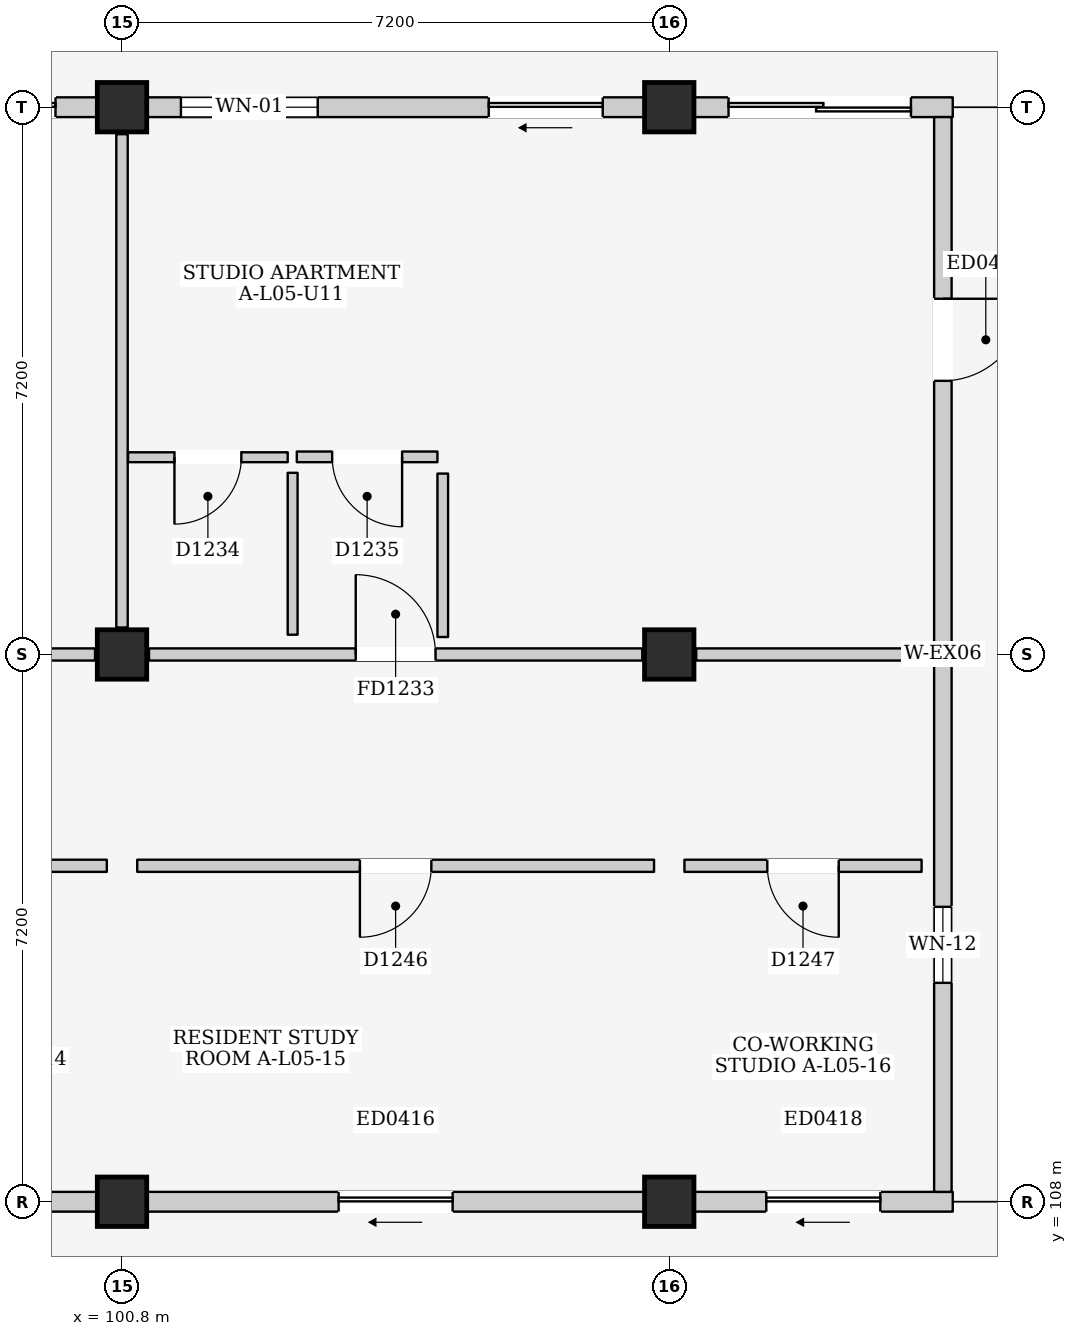
"""IFC4 building model, lengths in metres.
Left out: names, types, materials, properties, quantities, classifications, styles, units other than length and angle.
Written with IfcOpenShell. Run it as: python <this file> out.ifc"""

import sys

from ifc_helpers import new_model, si_unit, direction, frame, frame_2d, origin, origin_2d, place, context, subcontext, project, spatial, rectangle, extrude, element, fill, save


model = new_model("IFC4")
c1 = context("Model", 3, precision=1e-05, world=origin(), true_north=direction((0.0, 1.0)))
c2 = subcontext(c1, "Body", "Model", "MODEL_VIEW")
j1 = project(units=[si_unit("LENGTHUNIT", "METRE"), si_unit("PLANEANGLEUNIT", "RADIAN")], contexts=[c1])
p1 = place(None, origin())
s1 = spatial("IfcSite", under=j1, at=p1, CompositionType="ELEMENT")
p2 = place(p1, origin())
s2 = spatial("IfcBuilding", under=s1, at=p2, CompositionType="ELEMENT")
p3 = place(p2, frame((0.0, 0.0, 18.6)))
s3 = spatial("IfcBuildingStorey", under=s2, at=p3, CompositionType="ELEMENT", Elevation=18.6)
for number, where, z_axis, x_axis in (
    (1, (100.8, 108.0, 0.0), (0.0, 0.0, 1.0), (1.0, 0.0, 0.0)),
    (2, (100.8, 115.2, 0.0), (0.0, 0.0, 1.0), (1.0, 0.0, 0.0)),
    (3, (100.8, 122.4, 0.0), (0.0, 0.0, 1.0), (1.0, 0.0, 0.0)),
    (4, (108.0, 108.0, 0.0), (0.0, 0.0, 1.0), (1.0, 0.0, 0.0)),
    (5, (108.0, 115.2, 0.0), (0.0, 0.0, 1.0), (1.0, 0.0, 0.0)),
    (6, (108.0, 122.4, 0.0), (0.0, 0.0, 1.0), (1.0, 0.0, 0.0)),
):
    element("IfcColumn", number, at=place(p3, frame(where, z_axis=z_axis, x_axis=x_axis)), inside=s3, PredefinedType="COLUMN", context=c2, shape_type="SweptSolid", body=[
        extrude(rectangle(XDim=0.65, YDim=0.65, at=origin_2d()), origin(), (0.0, 0.0, 1.0), 3.3),
    ])
p4 = place(p3, frame((93.925, 122.4, 0.0), z_axis=(0.0, 0.0, 1.0), x_axis=(1.0, 0.0, 0.0)))
e7 = element("IfcWall", 7, at=p4, inside=s3, PredefinedType="ELEMENTEDWALL", context=c2, shape_type="SweptSolid", body=[
    extrude(rectangle(XDim=6.55, YDim=0.26, at=frame_2d((3.275, 0.0))), origin(), (0.0, 0.0, 1.0), 2.595),
])
p5 = place(p4, frame((4.4, 0.0, 0.0)))
e8 = element("IfcOpeningElement", 8, at=p5, cuts=e7, PredefinedType="OPENING", context=c2, shape_type="SweptSolid", body=[
    extrude(rectangle(XDim=1.6, YDim=2.12, at=frame_2d((0.8, 1.06))), frame((0.0, 0.145, 0.0), z_axis=(0.0, -1.0, 0.0), x_axis=(1.0, 0.0, 0.0)), (0.0, 0.0, 1.0), 0.29),
])
p6 = place(p4, frame((0.45, 0.0, 0.9)))
e9 = element("IfcOpeningElement", 9, at=p6, cuts=e7, PredefinedType="OPENING", context=c2, shape_type="SweptSolid", body=[
    extrude(rectangle(XDim=1.75, YDim=1.55, at=frame_2d((0.875, 0.775))), frame((0.0, 0.145, 0.0), z_axis=(0.0, -1.0, 0.0), x_axis=(1.0, 0.0, 0.0)), (0.0, 0.0, 1.0), 0.29),
])
p7 = place(p3, frame((93.925, 108.0, 0.0), z_axis=(0.0, 0.0, 1.0), x_axis=(1.0, 0.0, 0.0)))
e10 = element("IfcWall", 10, at=p7, inside=s3, PredefinedType="ELEMENTEDWALL", context=c2, shape_type="SweptSolid", body=[
    extrude(rectangle(XDim=6.55, YDim=0.26, at=frame_2d((3.275, 0.0))), origin(), (0.0, 0.0, 1.0), 2.395),
])
p8 = place(p7, frame((2.525, 0.0, 0.0)))
e11 = element("IfcOpeningElement", 11, at=p8, cuts=e10, PredefinedType="OPENING", context=c2, shape_type="SweptSolid", body=[
    extrude(rectangle(XDim=1.5, YDim=2.12, at=frame_2d((0.75, 1.06))), frame((0.0, 0.145, 0.0), z_axis=(0.0, -1.0, 0.0), x_axis=(1.0, 0.0, 0.0)), (0.0, 0.0, 1.0), 0.29),
])
p9 = place(p3, frame((101.125, 122.4, 0.0), z_axis=(0.0, 0.0, 1.0), x_axis=(1.0, 0.0, 0.0)))
e12 = element("IfcWall", 12, at=p9, inside=s3, PredefinedType="ELEMENTEDWALL", context=c2, shape_type="SweptSolid", body=[
    extrude(rectangle(XDim=6.55, YDim=0.26, at=frame_2d((3.275, 0.0))), origin(), (0.0, 0.0, 1.0), 2.595),
])
p10 = place(p9, frame((4.5, 0.0, 0.0)))
e13 = element("IfcOpeningElement", 13, at=p10, cuts=e12, PredefinedType="OPENING", context=c2, shape_type="SweptSolid", body=[
    extrude(rectangle(XDim=1.5, YDim=2.12, at=frame_2d((0.75, 1.06))), frame((0.0, 0.145, 0.0), z_axis=(0.0, -1.0, 0.0), x_axis=(1.0, 0.0, 0.0)), (0.0, 0.0, 1.0), 0.29),
])
p11 = place(p9, frame((0.45, 0.0, 0.9)))
e14 = element("IfcOpeningElement", 14, at=p11, cuts=e12, PredefinedType="OPENING", context=c2, shape_type="SweptSolid", body=[
    extrude(rectangle(XDim=1.8, YDim=1.5, at=frame_2d((0.9, 0.75))), frame((0.0, 0.145, 0.0), z_axis=(0.0, -1.0, 0.0), x_axis=(1.0, 0.0, 0.0)), (0.0, 0.0, 1.0), 0.29),
])
p12 = place(p3, frame((101.125, 108.0, 0.0), z_axis=(0.0, 0.0, 1.0), x_axis=(1.0, 0.0, 0.0)))
e15 = element("IfcWall", 15, at=p12, inside=s3, PredefinedType="ELEMENTEDWALL", context=c2, shape_type="SweptSolid", body=[
    extrude(rectangle(XDim=6.55, YDim=0.26, at=frame_2d((3.275, 0.0))), origin(), (0.0, 0.0, 1.0), 2.395),
])
p13 = place(p12, frame((2.525, 0.0, 0.0)))
e16 = element("IfcOpeningElement", 16, at=p13, cuts=e15, PredefinedType="OPENING", context=c2, shape_type="SweptSolid", body=[
    extrude(rectangle(XDim=1.5, YDim=2.12, at=frame_2d((0.75, 1.06))), frame((0.0, 0.145, 0.0), z_axis=(0.0, -1.0, 0.0), x_axis=(1.0, 0.0, 0.0)), (0.0, 0.0, 1.0), 0.29),
])
p14 = place(p3, frame((108.325, 122.4, 0.0), z_axis=(0.0, 0.0, 1.0), x_axis=(1.0, 0.0, 0.0)))
e17 = element("IfcWall", 17, at=p14, inside=s3, PredefinedType="ELEMENTEDWALL", context=c2, shape_type="SweptSolid", body=[
    extrude(rectangle(XDim=3.405, YDim=0.26, at=frame_2d((1.703, 0.0))), origin(), (0.0, 0.0, 1.0), 2.395),
])
p15 = place(p14, frame((0.455, 0.0, 0.0)))
e18 = element("IfcOpeningElement", 18, at=p15, cuts=e17, PredefinedType="OPENING", context=c2, shape_type="SweptSolid", body=[
    extrude(rectangle(XDim=2.4, YDim=2.12, at=frame_2d((1.2, 1.06))), frame((0.0, 0.145, 0.0), z_axis=(0.0, -1.0, 0.0), x_axis=(1.0, 0.0, 0.0)), (0.0, 0.0, 1.0), 0.29),
])
p16 = place(p3, frame((108.325, 108.0, 0.0), z_axis=(0.0, 0.0, 1.0), x_axis=(1.0, 0.0, 0.0)))
e19 = element("IfcWall", 19, at=p16, inside=s3, PredefinedType="ELEMENTEDWALL", context=c2, shape_type="SweptSolid", body=[
    extrude(rectangle(XDim=3.405, YDim=0.26, at=frame_2d((1.703, 0.0))), origin(), (0.0, 0.0, 1.0), 2.395),
])
p17 = place(p16, frame((0.952, 0.0, 0.0)))
e20 = element("IfcOpeningElement", 20, at=p17, cuts=e19, PredefinedType="OPENING", context=c2, shape_type="SweptSolid", body=[
    extrude(rectangle(XDim=1.5, YDim=2.12, at=frame_2d((0.75, 1.06))), frame((0.0, 0.145, 0.0), z_axis=(0.0, -1.0, 0.0), x_axis=(1.0, 0.0, 0.0)), (0.0, 0.0, 1.0), 0.29),
])
p18 = place(p3, frame((111.6, 108.13, 0.0), z_axis=(0.0, 0.0, 1.0), x_axis=(0.0, 1.0, 0.0)))
e21 = element("IfcWall", 21, at=p18, inside=s3, PredefinedType="ELEMENTEDWALL", context=c2, shape_type="SweptSolid", body=[
    extrude(rectangle(XDim=7.07, YDim=0.23, at=frame_2d((3.535, 0.0))), origin(), (0.0, 0.0, 1.0), 2.495),
])
p19 = place(p18, frame((2.75, 0.0, 1.1)))
e22 = element("IfcOpeningElement", 22, at=p19, cuts=e21, PredefinedType="OPENING", context=c2, shape_type="SweptSolid", body=[
    extrude(rectangle(XDim=1.0, YDim=0.9, at=frame_2d((0.5, 0.45))), frame((0.0, 0.13, 0.0), z_axis=(0.0, -1.0, 0.0), x_axis=(1.0, 0.0, 0.0)), (0.0, 0.0, 1.0), 0.26),
])
p20 = place(p3, frame((111.6, 115.2, 0.0), z_axis=(0.0, 0.0, 1.0), x_axis=(0.0, 1.0, 0.0)))
e23 = element("IfcWall", 23, at=p20, inside=s3, PredefinedType="ELEMENTEDWALL", context=c2, shape_type="SweptSolid", body=[
    extrude(rectangle(XDim=7.07, YDim=0.23, at=frame_2d((3.535, 0.0))), origin(), (0.0, 0.0, 1.0), 2.495),
])
p21 = place(p20, frame((3.6, 0.0, 0.0)))
e24 = element("IfcOpeningElement", 24, at=p21, cuts=e23, PredefinedType="OPENING", context=c2, shape_type="SweptSolid", body=[
    extrude(rectangle(XDim=1.08, YDim=2.12, at=frame_2d((0.54, 1.06))), frame((0.0, 0.13, 0.0), z_axis=(0.0, -1.0, 0.0), x_axis=(1.0, 0.0, 0.0)), (0.0, 0.0, 1.0), 0.26),
])
p22 = place(p3, frame((93.955, 115.2, 0.0), z_axis=(0.0, 0.0, 1.0), x_axis=(1.0, 0.0, 0.0)))
e25 = element("IfcWall", 25, at=p22, inside=s3, PredefinedType="PARTITIONING", context=c2, shape_type="SweptSolid", body=[
    extrude(rectangle(XDim=6.49, YDim=0.16, at=frame_2d((3.245, 0.0))), origin(), (0.0, 0.0, 1.0), 2.395),
])
p23 = place(p22, frame((2.72, 0.0, 0.0)))
e26 = element("IfcOpeningElement", 26, at=p23, cuts=e25, PredefinedType="OPENING", context=c2, shape_type="SweptSolid", body=[
    extrude(rectangle(XDim=1.05, YDim=2.15, at=frame_2d((0.525, 1.075))), frame((0.0, 0.095, 0.0), z_axis=(0.0, -1.0, 0.0), x_axis=(1.0, 0.0, 0.0)), (0.0, 0.0, 1.0), 0.19),
])
p24 = place(p3, frame((100.8, 115.555, 0.0), z_axis=(0.0, 0.0, 1.0), x_axis=(0.0, 1.0, 0.0)))
e27 = element("IfcWall", 27, at=p24, inside=s3, PredefinedType="PARTITIONING", context=c2, shape_type="SweptSolid", body=[
    extrude(rectangle(XDim=6.49, YDim=0.15, at=frame_2d((3.245, 0.0))), origin(), (0.0, 0.0, 1.0), 2.545),
])
p25 = place(p3, frame((101.155, 115.2, 0.0), z_axis=(0.0, 0.0, 1.0), x_axis=(1.0, 0.0, 0.0)))
e28 = element("IfcWall", 28, at=p25, inside=s3, PredefinedType="PARTITIONING", context=c2, shape_type="SweptSolid", body=[
    extrude(rectangle(XDim=6.49, YDim=0.16, at=frame_2d((3.245, 0.0))), origin(), (0.0, 0.0, 1.0), 2.395),
])
p26 = place(p25, frame((2.72, 0.0, 0.0)))
e29 = element("IfcOpeningElement", 29, at=p26, cuts=e28, PredefinedType="OPENING", context=c2, shape_type="SweptSolid", body=[
    extrude(rectangle(XDim=1.05, YDim=2.15, at=frame_2d((0.525, 1.075))), frame((0.0, 0.095, 0.0), z_axis=(0.0, -1.0, 0.0), x_axis=(1.0, 0.0, 0.0)), (0.0, 0.0, 1.0), 0.19),
])
p27 = place(p3, frame((108.355, 115.2, 0.0), z_axis=(0.0, 0.0, 1.0), x_axis=(1.0, 0.0, 0.0)))
e30 = element("IfcWall", 30, at=p27, inside=s3, PredefinedType="PARTITIONING", context=c2, shape_type="SweptSolid", body=[
    extrude(rectangle(XDim=2.965, YDim=0.16, at=frame_2d((1.482, 0.0))), origin(), (0.0, 0.0, 1.0), 2.395),
])
p28 = place(p3, frame((100.88, 117.795, 0.0), z_axis=(0.0, 0.0, 1.0), x_axis=(1.0, 0.0, 0.0)))
e31 = element("IfcWall", 31, at=p28, inside=s3, PredefinedType="PARTITIONING", context=c2, shape_type="SweptSolid", body=[
    extrude(rectangle(XDim=2.1, YDim=0.13, at=frame_2d((1.05, 0.0))), origin(), (0.0, 0.0, 1.0), 3.06),
])
p29 = place(p28, frame((0.61, 0.0, 0.0)))
e32 = element("IfcOpeningElement", 32, at=p29, cuts=e31, PredefinedType="OPENING", context=c2, shape_type="SweptSolid", body=[
    extrude(rectangle(XDim=0.88, YDim=2.1, at=frame_2d((0.44, 1.05))), frame((0.0, 0.08, 0.0), z_axis=(0.0, -1.0, 0.0), x_axis=(1.0, 0.0, 0.0)), (0.0, 0.0, 1.0), 0.16),
])
p30 = place(p3, frame((103.045, 115.46, 0.0), z_axis=(0.0, 0.0, 1.0), x_axis=(0.0, 1.0, 0.0)))
e33 = element("IfcWall", 33, at=p30, inside=s3, PredefinedType="PARTITIONING", context=c2, shape_type="SweptSolid", body=[
    extrude(rectangle(XDim=2.13, YDim=0.13, at=frame_2d((1.065, 0.0))), origin(), (0.0, 0.0, 1.0), 3.06),
])
p31 = place(p3, frame((103.1, 117.8, 0.0), z_axis=(0.0, 0.0, 1.0), x_axis=(1.0, 0.0, 0.0)))
e34 = element("IfcWall", 34, at=p31, inside=s3, PredefinedType="PARTITIONING", context=c2, shape_type="SweptSolid", body=[
    extrude(rectangle(XDim=1.85, YDim=0.14, at=frame_2d((0.925, 0.0))), origin(), (0.0, 0.0, 1.0), 3.06),
])
p32 = place(p31, frame((0.465, 0.0, 0.0)))
e35 = element("IfcOpeningElement", 35, at=p32, cuts=e34, PredefinedType="OPENING", context=c2, shape_type="SweptSolid", body=[
    extrude(rectangle(XDim=0.92, YDim=2.1, at=frame_2d((0.46, 1.05))), frame((0.0, 0.085, 0.0), z_axis=(0.0, -1.0, 0.0), x_axis=(1.0, 0.0, 0.0)), (0.0, 0.0, 1.0), 0.17),
])
p33 = place(p3, frame((105.02, 115.43, 0.0), z_axis=(0.0, 0.0, 1.0), x_axis=(0.0, 1.0, 0.0)))
e36 = element("IfcWall", 36, at=p33, inside=s3, PredefinedType="PARTITIONING", context=c2, shape_type="SweptSolid", body=[
    extrude(rectangle(XDim=2.15, YDim=0.14, at=frame_2d((1.075, 0.0))), origin(), (0.0, 0.0, 1.0), 3.06),
])
p34 = place(p3, frame((93.8, 112.42, 0.0), z_axis=(0.0, 0.0, 1.0), x_axis=(1.0, 0.0, 0.0)))
e37 = element("IfcWall", 37, at=p34, inside=s3, PredefinedType="PARTITIONING", context=c2, shape_type="SweptSolid", body=[
    extrude(rectangle(XDim=6.8, YDim=0.16, at=frame_2d((3.4, 0.0))), origin(), (0.0, 0.0, 1.0), 3.06),
])
p35 = place(p34, frame((2.93, 0.0, 0.0)))
e38 = element("IfcOpeningElement", 38, at=p35, cuts=e37, PredefinedType="OPENING", context=c2, shape_type="SweptSolid", body=[
    extrude(rectangle(XDim=0.94, YDim=2.12, at=frame_2d((0.47, 1.06))), frame((0.0, 0.095, 0.0), z_axis=(0.0, -1.0, 0.0), x_axis=(1.0, 0.0, 0.0)), (0.0, 0.0, 1.0), 0.19),
])
p36 = place(p3, frame((101.0, 112.42, 0.0), z_axis=(0.0, 0.0, 1.0), x_axis=(1.0, 0.0, 0.0)))
e39 = element("IfcWall", 39, at=p36, inside=s3, PredefinedType="PARTITIONING", context=c2, shape_type="SweptSolid", body=[
    extrude(rectangle(XDim=6.8, YDim=0.16, at=frame_2d((3.4, 0.0))), origin(), (0.0, 0.0, 1.0), 3.06),
])
p37 = place(p36, frame((2.93, 0.0, 0.0)))
e40 = element("IfcOpeningElement", 40, at=p37, cuts=e39, PredefinedType="OPENING", context=c2, shape_type="SweptSolid", body=[
    extrude(rectangle(XDim=0.94, YDim=2.12, at=frame_2d((0.47, 1.06))), frame((0.0, 0.095, 0.0), z_axis=(0.0, -1.0, 0.0), x_axis=(1.0, 0.0, 0.0)), (0.0, 0.0, 1.0), 0.19),
])
p38 = place(p3, frame((108.2, 112.42, 0.0), z_axis=(0.0, 0.0, 1.0), x_axis=(1.0, 0.0, 0.0)))
e41 = element("IfcWall", 41, at=p38, inside=s3, PredefinedType="PARTITIONING", context=c2, shape_type="SweptSolid", body=[
    extrude(rectangle(XDim=3.12, YDim=0.16, at=frame_2d((1.56, 0.0))), origin(), (0.0, 0.0, 1.0), 3.06),
])
p39 = place(p38, frame((1.09, 0.0, 0.0)))
e42 = element("IfcOpeningElement", 42, at=p39, cuts=e41, PredefinedType="OPENING", context=c2, shape_type="SweptSolid", body=[
    extrude(rectangle(XDim=0.94, YDim=2.12, at=frame_2d((0.47, 1.06))), frame((0.0, 0.095, 0.0), z_axis=(0.0, -1.0, 0.0), x_axis=(1.0, 0.0, 0.0)), (0.0, 0.0, 1.0), 0.19),
])
p40 = place(p5, frame((1.6, 0.0, 0.0), z_axis=(0.0, 0.0, 1.0), x_axis=(-1.0, 0.0, 0.0)))
e43 = element("IfcDoor", 43, at=p40, inside=s3, OperationType="SLIDING_TO_RIGHT", PredefinedType="DOOR", context=c2, shape_type="SweptSolid", body=[
    extrude(rectangle(XDim=1.6, YDim=2.12, at=frame_2d((0.8, 1.06))), frame((0.0, 0.025, 0.0), z_axis=(0.0, -1.0, 0.0), x_axis=(1.0, 0.0, 0.0)), (0.0, 0.0, 1.0), 0.05),
])
fill(e8, e43)
p41 = place(p10, frame((1.5, 0.0, 0.0), z_axis=(0.0, 0.0, 1.0), x_axis=(-1.0, 0.0, 0.0)))
e44 = element("IfcDoor", 44, at=p41, inside=s3, OperationType="SLIDING_TO_LEFT", PredefinedType="DOOR", context=c2, shape_type="SweptSolid", body=[
    extrude(rectangle(XDim=1.5, YDim=2.12, at=frame_2d((0.75, 1.06))), frame((0.0, 0.025, 0.0), z_axis=(0.0, -1.0, 0.0), x_axis=(1.0, 0.0, 0.0)), (0.0, 0.0, 1.0), 0.05),
])
fill(e13, e44)
p42 = place(p11, origin())
e45 = element("IfcWindow", 45, at=p42, inside=s3, PartitioningType="DOUBLE_PANEL_VERTICAL", PredefinedType="WINDOW", context=c2, shape_type="SweptSolid", body=[
    extrude(rectangle(XDim=1.8, YDim=1.5, at=frame_2d((0.9, 0.75))), frame((0.0, 0.03, 0.0), z_axis=(0.0, -1.0, 0.0), x_axis=(1.0, 0.0, 0.0)), (0.0, 0.0, 1.0), 0.06),
])
fill(e14, e45)
p43 = place(p13, frame((1.5, 0.0, 0.0), z_axis=(0.0, 0.0, 1.0), x_axis=(-1.0, 0.0, 0.0)))
e46 = element("IfcDoor", 46, at=p43, inside=s3, OperationType="SLIDING_TO_LEFT", PredefinedType="DOOR", context=c2, shape_type="SweptSolid", body=[
    extrude(rectangle(XDim=1.5, YDim=2.12, at=frame_2d((0.75, 1.06))), frame((0.0, 0.025, 0.0), z_axis=(0.0, -1.0, 0.0), x_axis=(1.0, 0.0, 0.0)), (0.0, 0.0, 1.0), 0.05),
])
fill(e16, e46)
p44 = place(p15, frame((2.4, 0.0, 0.0), z_axis=(0.0, 0.0, 1.0), x_axis=(-1.0, 0.0, 0.0)))
e47 = element("IfcDoor", 47, at=p44, inside=s3, OperationType="DOUBLE_DOOR_SLIDING", PredefinedType="DOOR", context=c2, shape_type="SweptSolid", body=[
    extrude(rectangle(XDim=2.4, YDim=2.12, at=frame_2d((1.2, 1.06))), frame((0.0, 0.025, 0.0), z_axis=(0.0, -1.0, 0.0), x_axis=(1.0, 0.0, 0.0)), (0.0, 0.0, 1.0), 0.05),
])
fill(e18, e47)
p45 = place(p17, frame((1.5, 0.0, 0.0), z_axis=(0.0, 0.0, 1.0), x_axis=(-1.0, 0.0, 0.0)))
e48 = element("IfcDoor", 48, at=p45, inside=s3, OperationType="SLIDING_TO_LEFT", PredefinedType="DOOR", context=c2, shape_type="SweptSolid", body=[
    extrude(rectangle(XDim=1.5, YDim=2.12, at=frame_2d((0.75, 1.06))), frame((0.0, 0.025, 0.0), z_axis=(0.0, -1.0, 0.0), x_axis=(1.0, 0.0, 0.0)), (0.0, 0.0, 1.0), 0.05),
])
fill(e20, e48)
p46 = place(p19, origin())
e49 = element("IfcWindow", 49, at=p46, inside=s3, PartitioningType="SINGLE_PANEL", PredefinedType="WINDOW", context=c2, shape_type="SweptSolid", body=[
    extrude(rectangle(XDim=1.0, YDim=0.9, at=frame_2d((0.5, 0.45))), frame((0.0, 0.03, 0.0), z_axis=(0.0, -1.0, 0.0), x_axis=(1.0, 0.0, 0.0)), (0.0, 0.0, 1.0), 0.06),
])
fill(e22, e49)
p47 = place(p21, frame((1.08, 0.0, 0.0), z_axis=(0.0, 0.0, 1.0), x_axis=(-1.0, 0.0, 0.0)))
e50 = element("IfcDoor", 50, at=p47, inside=s3, OperationType="SINGLE_SWING_LEFT", PredefinedType="DOOR", context=c2, shape_type="SweptSolid", body=[
    extrude(rectangle(XDim=1.08, YDim=2.12, at=frame_2d((0.54, 1.06))), frame((0.0, 0.025, 0.0), z_axis=(0.0, -1.0, 0.0), x_axis=(1.0, 0.0, 0.0)), (0.0, 0.0, 1.0), 0.05),
])
fill(e24, e50)
p48 = place(p26, origin())
e51 = element("IfcDoor", 51, at=p48, inside=s3, OperationType="SINGLE_SWING_LEFT", PredefinedType="DOOR", context=c2, shape_type="SweptSolid", body=[
    extrude(rectangle(XDim=1.05, YDim=2.15, at=frame_2d((0.525, 1.075))), frame((0.0, 0.025, 0.0), z_axis=(0.0, -1.0, 0.0), x_axis=(1.0, 0.0, 0.0)), (0.0, 0.0, 1.0), 0.05),
])
fill(e29, e51)
p49 = place(p29, frame((0.88, 0.0, 0.0), z_axis=(0.0, 0.0, 1.0), x_axis=(-1.0, 0.0, 0.0)))
e52 = element("IfcDoor", 52, at=p49, inside=s3, OperationType="SINGLE_SWING_RIGHT", PredefinedType="DOOR", context=c2, shape_type="SweptSolid", body=[
    extrude(rectangle(XDim=0.88, YDim=2.1, at=frame_2d((0.44, 1.05))), frame((0.0, 0.025, 0.0), z_axis=(0.0, -1.0, 0.0), x_axis=(1.0, 0.0, 0.0)), (0.0, 0.0, 1.0), 0.05),
])
fill(e32, e52)
p50 = place(p32, frame((0.92, 0.0, 0.0), z_axis=(0.0, 0.0, 1.0), x_axis=(-1.0, 0.0, 0.0)))
e53 = element("IfcDoor", 53, at=p50, inside=s3, OperationType="SINGLE_SWING_LEFT", PredefinedType="DOOR", context=c2, shape_type="SweptSolid", body=[
    extrude(rectangle(XDim=0.92, YDim=2.1, at=frame_2d((0.46, 1.05))), frame((0.0, 0.025, 0.0), z_axis=(0.0, -1.0, 0.0), x_axis=(1.0, 0.0, 0.0)), (0.0, 0.0, 1.0), 0.05),
])
fill(e35, e53)
p51 = place(p37, frame((0.94, 0.0, 0.0), z_axis=(0.0, 0.0, 1.0), x_axis=(-1.0, 0.0, 0.0)))
e54 = element("IfcDoor", 54, at=p51, inside=s3, OperationType="SINGLE_SWING_RIGHT", PredefinedType="DOOR", context=c2, shape_type="SweptSolid", body=[
    extrude(rectangle(XDim=0.94, YDim=2.12, at=frame_2d((0.47, 1.06))), frame((0.0, 0.025, 0.0), z_axis=(0.0, -1.0, 0.0), x_axis=(1.0, 0.0, 0.0)), (0.0, 0.0, 1.0), 0.05),
])
fill(e40, e54)
p52 = place(p39, frame((0.94, 0.0, 0.0), z_axis=(0.0, 0.0, 1.0), x_axis=(-1.0, 0.0, 0.0)))
e55 = element("IfcDoor", 55, at=p52, inside=s3, OperationType="SINGLE_SWING_LEFT", PredefinedType="DOOR", context=c2, shape_type="SweptSolid", body=[
    extrude(rectangle(XDim=0.94, YDim=2.12, at=frame_2d((0.47, 1.06))), frame((0.0, 0.025, 0.0), z_axis=(0.0, -1.0, 0.0), x_axis=(1.0, 0.0, 0.0)), (0.0, 0.0, 1.0), 0.05),
])
fill(e42, e55)
save(model, sys.argv[1])
